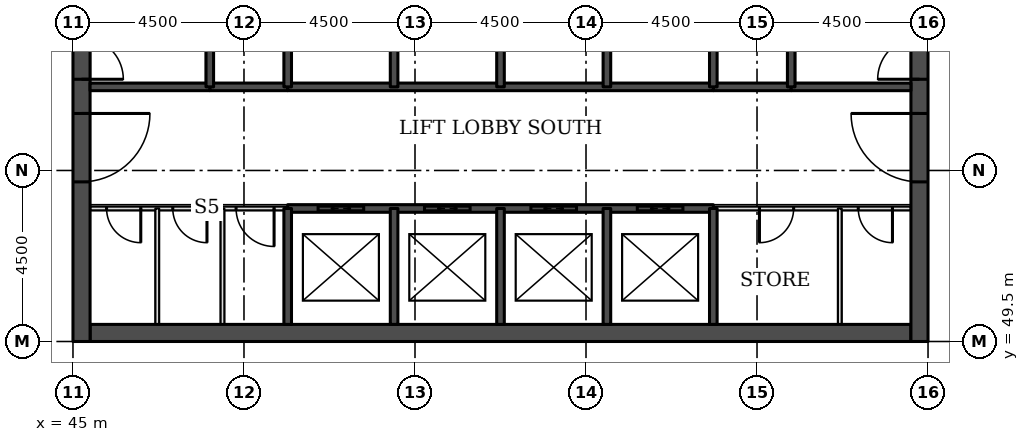
"""IFC4 building model, lengths in metres.
Left out: names, types, materials, properties, quantities, classifications, styles, units other than length and angle.
Written with IfcOpenShell. Run it as: python <this file> out.ifc"""

import sys

from ifc_helpers import new_model, si_unit, direction, frame, frame_2d, origin, place, context, subcontext, project, spatial, rectangle, extrude, element, fill, save


model = new_model("IFC4")
c1 = context("Model", 3, precision=1e-05, world=origin(), true_north=direction((0.0, 1.0)))
c2 = subcontext(c1, "Body", "Model", "MODEL_VIEW")
j1 = project(units=[si_unit("LENGTHUNIT", "METRE"), si_unit("PLANEANGLEUNIT", "RADIAN")], contexts=[c1])
p1 = place(None, origin())
s1 = spatial("IfcSite", under=j1, at=p1, CompositionType="ELEMENT")
p2 = place(p1, origin())
s2 = spatial("IfcBuilding", under=s1, at=p2, CompositionType="ELEMENT")
p3 = place(p2, frame((0.0, 0.0, 74.3)))
s3 = spatial("IfcBuildingStorey", under=s2, at=p3, CompositionType="ELEMENT", Elevation=74.3)
p4 = place(p3, frame((45.45, 49.725, 0.0), z_axis=(0.0, 0.0, 1.0), x_axis=(1.0, 0.0, 0.0)))
e1 = element("IfcWall", 1, at=p4, inside=s3, PredefinedType="SHEAR", context=c2, shape_type="SweptSolid", body=[
    extrude(rectangle(XDim=21.6, YDim=0.45, at=frame_2d((10.8, 0.0))), origin(), (0.0, 0.0, 1.0), 4.6),
])
p5 = place(p3, frame((45.225, 49.5, 0.0), z_axis=(0.0, 0.0, 1.0), x_axis=(0.0, 1.0, 0.0)))
e2 = element("IfcWall", 2, at=p5, inside=s3, PredefinedType="SHEAR", context=c2, shape_type="SweptSolid", body=[
    extrude(rectangle(XDim=22.5, YDim=0.45, at=frame_2d((11.25, 0.0))), origin(), (0.0, 0.0, 1.0), 4.6),
])
p6 = place(p5, frame((4.2, 0.0, 0.0)))
e3 = element("IfcOpeningElement", 3, at=p6, cuts=e2, PredefinedType="OPENING", context=c2, shape_type="SweptSolid", body=[
    extrude(rectangle(XDim=1.8, YDim=2.1, at=frame_2d((0.9, 1.05))), frame((0.0, 0.235, 0.0), z_axis=(0.0, -1.0, 0.0), x_axis=(1.0, 0.0, 0.0)), (0.0, 0.0, 1.0), 0.47),
])
p7 = place(p5, frame((6.9, 0.0, 0.0)))
e4 = element("IfcOpeningElement", 4, at=p7, cuts=e2, PredefinedType="OPENING", context=c2, shape_type="SweptSolid", body=[
    extrude(rectangle(XDim=1.1, YDim=2.1, at=frame_2d((0.55, 1.05))), frame((0.0, 0.235, 0.0), z_axis=(0.0, -1.0, 0.0), x_axis=(1.0, 0.0, 0.0)), (0.0, 0.0, 1.0), 0.47),
])
p8 = place(p5, frame((13.6, 0.0, 0.0)))
e5 = element("IfcOpeningElement", 5, at=p8, cuts=e2, PredefinedType="OPENING", context=c2, shape_type="SweptSolid", body=[
    extrude(rectangle(XDim=1.1, YDim=2.1, at=frame_2d((0.55, 1.05))), frame((0.0, 0.235, 0.0), z_axis=(0.0, -1.0, 0.0), x_axis=(1.0, 0.0, 0.0)), (0.0, 0.0, 1.0), 0.47),
])
p9 = place(p5, frame((16.5, 0.0, 0.0)))
e6 = element("IfcOpeningElement", 6, at=p9, cuts=e2, PredefinedType="OPENING", context=c2, shape_type="SweptSolid", body=[
    extrude(rectangle(XDim=1.8, YDim=2.1, at=frame_2d((0.9, 1.05))), frame((0.0, 0.235, 0.0), z_axis=(0.0, -1.0, 0.0), x_axis=(1.0, 0.0, 0.0)), (0.0, 0.0, 1.0), 0.47),
])
p10 = place(p3, frame((67.275, 49.5, 0.0), z_axis=(0.0, 0.0, 1.0), x_axis=(0.0, 1.0, 0.0)))
e7 = element("IfcWall", 7, at=p10, inside=s3, PredefinedType="SHEAR", context=c2, shape_type="SweptSolid", body=[
    extrude(rectangle(XDim=22.5, YDim=0.45, at=frame_2d((11.25, 0.0))), origin(), (0.0, 0.0, 1.0), 4.6),
])
p11 = place(p10, frame((4.2, 0.0, 0.0)))
e8 = element("IfcOpeningElement", 8, at=p11, cuts=e7, PredefinedType="OPENING", context=c2, shape_type="SweptSolid", body=[
    extrude(rectangle(XDim=1.8, YDim=2.1, at=frame_2d((0.9, 1.05))), frame((0.0, 0.235, 0.0), z_axis=(0.0, -1.0, 0.0), x_axis=(1.0, 0.0, 0.0)), (0.0, 0.0, 1.0), 0.47),
])
p12 = place(p10, frame((6.9, 0.0, 0.0)))
e9 = element("IfcOpeningElement", 9, at=p12, cuts=e7, PredefinedType="OPENING", context=c2, shape_type="SweptSolid", body=[
    extrude(rectangle(XDim=1.1, YDim=2.1, at=frame_2d((0.55, 1.05))), frame((0.0, 0.235, 0.0), z_axis=(0.0, -1.0, 0.0), x_axis=(1.0, 0.0, 0.0)), (0.0, 0.0, 1.0), 0.47),
])
p13 = place(p10, frame((13.6, 0.0, 0.0)))
e10 = element("IfcOpeningElement", 10, at=p13, cuts=e7, PredefinedType="OPENING", context=c2, shape_type="SweptSolid", body=[
    extrude(rectangle(XDim=1.1, YDim=2.1, at=frame_2d((0.55, 1.05))), frame((0.0, 0.235, 0.0), z_axis=(0.0, -1.0, 0.0), x_axis=(1.0, 0.0, 0.0)), (0.0, 0.0, 1.0), 0.47),
])
p14 = place(p10, frame((16.5, 0.0, 0.0)))
e11 = element("IfcOpeningElement", 11, at=p14, cuts=e7, PredefinedType="OPENING", context=c2, shape_type="SweptSolid", body=[
    extrude(rectangle(XDim=1.8, YDim=2.1, at=frame_2d((0.9, 1.05))), frame((0.0, 0.235, 0.0), z_axis=(0.0, -1.0, 0.0), x_axis=(1.0, 0.0, 0.0)), (0.0, 0.0, 1.0), 0.47),
])
p15 = place(p3, frame((45.45, 53.0, 0.0), z_axis=(0.0, 0.0, 1.0), x_axis=(1.0, 0.0, 0.0)))
e12 = element("IfcWall", 12, at=p15, inside=s3, PredefinedType="PARTITIONING", context=c2, shape_type="SweptSolid", body=[
    extrude(rectangle(XDim=5.2, YDim=0.1, at=frame_2d((2.6, 0.0))), origin(), (0.0, 0.0, 1.0), 4.45),
])
p16 = place(p15, frame((0.434, 0.0, 0.0)))
e13 = element("IfcOpeningElement", 13, at=p16, cuts=e12, PredefinedType="OPENING", context=c2, shape_type="SweptSolid", body=[
    extrude(rectangle(XDim=0.9, YDim=2.1, at=frame_2d((0.45, 1.05))), frame((0.0, 0.06, 0.0), z_axis=(0.0, -1.0, 0.0), x_axis=(1.0, 0.0, 0.0)), (0.0, 0.0, 1.0), 0.12),
])
p17 = place(p15, frame((2.176, 0.0, 0.0)))
e14 = element("IfcOpeningElement", 14, at=p17, cuts=e12, PredefinedType="OPENING", context=c2, shape_type="SweptSolid", body=[
    extrude(rectangle(XDim=0.9, YDim=2.1, at=frame_2d((0.45, 1.05))), frame((0.0, 0.06, 0.0), z_axis=(0.0, -1.0, 0.0), x_axis=(1.0, 0.0, 0.0)), (0.0, 0.0, 1.0), 0.12),
])
p18 = place(p15, frame((3.842, 0.0, 0.0)))
e15 = element("IfcOpeningElement", 15, at=p18, cuts=e12, PredefinedType="OPENING", context=c2, shape_type="SweptSolid", body=[
    extrude(rectangle(XDim=1.0, YDim=2.1, at=frame_2d((0.5, 1.05))), frame((0.0, 0.06, 0.0), z_axis=(0.0, -1.0, 0.0), x_axis=(1.0, 0.0, 0.0)), (0.0, 0.0, 1.0), 0.12),
])
p19 = place(p3, frame((61.85, 53.0, 0.0), z_axis=(0.0, 0.0, 1.0), x_axis=(1.0, 0.0, 0.0)))
e16 = element("IfcWall", 16, at=p19, inside=s3, PredefinedType="PARTITIONING", context=c2, shape_type="SweptSolid", body=[
    extrude(rectangle(XDim=5.2, YDim=0.1, at=frame_2d((2.6, 0.0))), origin(), (0.0, 0.0, 1.0), 4.45),
])
p20 = place(p19, frame((3.814, 0.0, 0.0)))
e17 = element("IfcOpeningElement", 17, at=p20, cuts=e16, PredefinedType="OPENING", context=c2, shape_type="SweptSolid", body=[
    extrude(rectangle(XDim=0.9, YDim=2.1, at=frame_2d((0.45, 1.05))), frame((0.0, 0.06, 0.0), z_axis=(0.0, -1.0, 0.0), x_axis=(1.0, 0.0, 0.0)), (0.0, 0.0, 1.0), 0.12),
])
p21 = place(p19, frame((1.214, 0.0, 0.0)))
e18 = element("IfcOpeningElement", 18, at=p21, cuts=e16, PredefinedType="OPENING", context=c2, shape_type="SweptSolid", body=[
    extrude(rectangle(XDim=0.9, YDim=2.1, at=frame_2d((0.45, 1.05))), frame((0.0, 0.06, 0.0), z_axis=(0.0, -1.0, 0.0), x_axis=(1.0, 0.0, 0.0)), (0.0, 0.0, 1.0), 0.12),
])
p22 = place(p3, frame((50.65, 53.0, 0.0), z_axis=(0.0, 0.0, 1.0), x_axis=(1.0, 0.0, 0.0)))
e19 = element("IfcWall", 19, at=p22, inside=s3, PredefinedType="SOLIDWALL", context=c2, shape_type="SweptSolid", body=[
    extrude(rectangle(XDim=11.2, YDim=0.2, at=frame_2d((5.6, 0.0))), origin(), (0.0, 0.0, 1.0), 4.45),
])
p23 = place(p22, frame((0.8, 0.0, 0.0)))
e20 = element("IfcOpeningElement", 20, at=p23, cuts=e19, PredefinedType="OPENING", context=c2, shape_type="SweptSolid", body=[
    extrude(rectangle(XDim=1.2, YDim=2.1, at=frame_2d((0.6, 1.05))), frame((0.0, 0.11, 0.0), z_axis=(0.0, -1.0, 0.0), x_axis=(1.0, 0.0, 0.0)), (0.0, 0.0, 1.0), 0.22),
])
p24 = place(p22, frame((3.6, 0.0, 0.0)))
e21 = element("IfcOpeningElement", 21, at=p24, cuts=e19, PredefinedType="OPENING", context=c2, shape_type="SweptSolid", body=[
    extrude(rectangle(XDim=1.2, YDim=2.1, at=frame_2d((0.6, 1.05))), frame((0.0, 0.11, 0.0), z_axis=(0.0, -1.0, 0.0), x_axis=(1.0, 0.0, 0.0)), (0.0, 0.0, 1.0), 0.22),
])
p25 = place(p22, frame((6.4, 0.0, 0.0)))
e22 = element("IfcOpeningElement", 22, at=p25, cuts=e19, PredefinedType="OPENING", context=c2, shape_type="SweptSolid", body=[
    extrude(rectangle(XDim=1.2, YDim=2.1, at=frame_2d((0.6, 1.05))), frame((0.0, 0.11, 0.0), z_axis=(0.0, -1.0, 0.0), x_axis=(1.0, 0.0, 0.0)), (0.0, 0.0, 1.0), 0.22),
])
p26 = place(p22, frame((9.2, 0.0, 0.0)))
e23 = element("IfcOpeningElement", 23, at=p26, cuts=e19, PredefinedType="OPENING", context=c2, shape_type="SweptSolid", body=[
    extrude(rectangle(XDim=1.2, YDim=2.1, at=frame_2d((0.6, 1.05))), frame((0.0, 0.11, 0.0), z_axis=(0.0, -1.0, 0.0), x_axis=(1.0, 0.0, 0.0)), (0.0, 0.0, 1.0), 0.22),
])
for number, where, z_axis, x_axis in (
    (24, (48.6, 56.2, 0.0), (0.0, 0.0, 1.0), (1.0, 0.0, 0.0)),
    (25, (61.85, 56.2, 0.0), (0.0, 0.0, 1.0), (1.0, 0.0, 0.0)),
):
    element("IfcWall", number, at=place(p3, frame(where, z_axis=z_axis, x_axis=x_axis)), inside=s3, PredefinedType="SOLIDWALL", context=c2, shape_type="SweptSolid", body=[
        extrude(rectangle(XDim=2.05, YDim=0.2, at=frame_2d((1.025, 0.0))), origin(), (0.0, 0.0, 1.0), 4.45),
    ])
p27 = place(p3, frame((45.45, 56.2, 0.0), z_axis=(0.0, 0.0, 1.0), x_axis=(1.0, 0.0, 0.0)))
e26 = element("IfcWall", 26, at=p27, inside=s3, PredefinedType="SOLIDWALL", context=c2, shape_type="SweptSolid", body=[
    extrude(rectangle(XDim=3.15, YDim=0.2, at=frame_2d((1.575, 0.0))), origin(), (0.0, 0.0, 1.0), 4.45),
])
p28 = place(p3, frame((50.65, 56.2, 0.0), z_axis=(0.0, 0.0, 1.0), x_axis=(1.0, 0.0, 0.0)))
e27 = element("IfcWall", 27, at=p28, inside=s3, PredefinedType="SOLIDWALL", context=c2, shape_type="SweptSolid", body=[
    extrude(rectangle(XDim=11.2, YDim=0.2, at=frame_2d((5.6, 0.0))), origin(), (0.0, 0.0, 1.0), 4.45),
])
p29 = place(p3, frame((63.9, 56.2, 0.0), z_axis=(0.0, 0.0, 1.0), x_axis=(1.0, 0.0, 0.0)))
e28 = element("IfcWall", 28, at=p29, inside=s3, PredefinedType="SOLIDWALL", context=c2, shape_type="SweptSolid", body=[
    extrude(rectangle(XDim=3.15, YDim=0.2, at=frame_2d((1.575, 0.0))), origin(), (0.0, 0.0, 1.0), 4.45),
])
p30 = place(p3, frame((47.218, 49.95, 0.0), z_axis=(0.0, 0.0, 1.0), x_axis=(0.0, 1.0, 0.0)))
e29 = element("IfcWall", 29, at=p30, inside=s3, PredefinedType="PARTITIONING", context=c2, shape_type="SweptSolid", body=[
    extrude(rectangle(XDim=3.05, YDim=0.1, at=frame_2d((1.525, 0.0))), origin(), (0.0, 0.0, 1.0), 4.45),
])
p31 = place(p3, frame((48.6, 56.2, 0.0), z_axis=(0.0, 0.0, 1.0), x_axis=(0.0, 1.0, 0.0)))
e30 = element("IfcWall", 30, at=p31, inside=s3, PredefinedType="SOLIDWALL", context=c2, shape_type="SweptSolid", body=[
    extrude(rectangle(XDim=5.8, YDim=0.2, at=frame_2d((2.9, 0.0))), origin(), (0.0, 0.0, 1.0), 4.45),
])
p32 = place(p3, frame((48.934, 49.95, 0.0), z_axis=(0.0, 0.0, 1.0), x_axis=(0.0, 1.0, 0.0)))
e31 = element("IfcWall", 31, at=p32, inside=s3, PredefinedType="PARTITIONING", context=c2, shape_type="SweptSolid", body=[
    extrude(rectangle(XDim=3.05, YDim=0.1, at=frame_2d((1.525, 0.0))), origin(), (0.0, 0.0, 1.0), 4.45),
])
p33 = place(p3, frame((50.65, 49.95, 0.0), z_axis=(0.0, 0.0, 1.0), x_axis=(0.0, 1.0, 0.0)))
e32 = element("IfcWall", 32, at=p33, inside=s3, PredefinedType="SOLIDWALL", context=c2, shape_type="SweptSolid", body=[
    extrude(rectangle(XDim=3.05, YDim=0.2, at=frame_2d((1.525, 0.0))), origin(), (0.0, 0.0, 1.0), 4.45),
])
p34 = place(p3, frame((50.65, 56.2, 0.0), z_axis=(0.0, 0.0, 1.0), x_axis=(0.0, 1.0, 0.0)))
e33 = element("IfcWall", 33, at=p34, inside=s3, PredefinedType="SOLIDWALL", context=c2, shape_type="SweptSolid", body=[
    extrude(rectangle(XDim=2.8, YDim=0.2, at=frame_2d((1.4, 0.0))), origin(), (0.0, 0.0, 1.0), 4.45),
])
p35 = place(p3, frame((53.45, 49.95, 0.0), z_axis=(0.0, 0.0, 1.0), x_axis=(0.0, 1.0, 0.0)))
e34 = element("IfcWall", 34, at=p35, inside=s3, PredefinedType="SOLIDWALL", context=c2, shape_type="SweptSolid", body=[
    extrude(rectangle(XDim=3.05, YDim=0.2, at=frame_2d((1.525, 0.0))), origin(), (0.0, 0.0, 1.0), 4.45),
])
p36 = place(p3, frame((53.45, 56.2, 0.0), z_axis=(0.0, 0.0, 1.0), x_axis=(0.0, 1.0, 0.0)))
e35 = element("IfcWall", 35, at=p36, inside=s3, PredefinedType="SOLIDWALL", context=c2, shape_type="SweptSolid", body=[
    extrude(rectangle(XDim=2.8, YDim=0.2, at=frame_2d((1.4, 0.0))), origin(), (0.0, 0.0, 1.0), 4.45),
])
p37 = place(p3, frame((56.25, 49.95, 0.0), z_axis=(0.0, 0.0, 1.0), x_axis=(0.0, 1.0, 0.0)))
e36 = element("IfcWall", 36, at=p37, inside=s3, PredefinedType="SOLIDWALL", context=c2, shape_type="SweptSolid", body=[
    extrude(rectangle(XDim=3.05, YDim=0.2, at=frame_2d((1.525, 0.0))), origin(), (0.0, 0.0, 1.0), 4.45),
])
p38 = place(p3, frame((56.25, 56.2, 0.0), z_axis=(0.0, 0.0, 1.0), x_axis=(0.0, 1.0, 0.0)))
e37 = element("IfcWall", 37, at=p38, inside=s3, PredefinedType="SOLIDWALL", context=c2, shape_type="SweptSolid", body=[
    extrude(rectangle(XDim=2.8, YDim=0.2, at=frame_2d((1.4, 0.0))), origin(), (0.0, 0.0, 1.0), 4.45),
])
p39 = place(p3, frame((59.05, 49.95, 0.0), z_axis=(0.0, 0.0, 1.0), x_axis=(0.0, 1.0, 0.0)))
e38 = element("IfcWall", 38, at=p39, inside=s3, PredefinedType="SOLIDWALL", context=c2, shape_type="SweptSolid", body=[
    extrude(rectangle(XDim=3.05, YDim=0.2, at=frame_2d((1.525, 0.0))), origin(), (0.0, 0.0, 1.0), 4.45),
])
p40 = place(p3, frame((59.05, 56.2, 0.0), z_axis=(0.0, 0.0, 1.0), x_axis=(0.0, 1.0, 0.0)))
e39 = element("IfcWall", 39, at=p40, inside=s3, PredefinedType="SOLIDWALL", context=c2, shape_type="SweptSolid", body=[
    extrude(rectangle(XDim=2.8, YDim=0.2, at=frame_2d((1.4, 0.0))), origin(), (0.0, 0.0, 1.0), 4.45),
])
p41 = place(p3, frame((61.85, 49.95, 0.0), z_axis=(0.0, 0.0, 1.0), x_axis=(0.0, 1.0, 0.0)))
e40 = element("IfcWall", 40, at=p41, inside=s3, PredefinedType="SOLIDWALL", context=c2, shape_type="SweptSolid", body=[
    extrude(rectangle(XDim=3.05, YDim=0.2, at=frame_2d((1.525, 0.0))), origin(), (0.0, 0.0, 1.0), 4.45),
])
p42 = place(p3, frame((61.85, 56.2, 0.0), z_axis=(0.0, 0.0, 1.0), x_axis=(0.0, 1.0, 0.0)))
e41 = element("IfcWall", 41, at=p42, inside=s3, PredefinedType="SOLIDWALL", context=c2, shape_type="SweptSolid", body=[
    extrude(rectangle(XDim=2.8, YDim=0.2, at=frame_2d((1.4, 0.0))), origin(), (0.0, 0.0, 1.0), 4.45),
])
p43 = place(p3, frame((63.9, 56.2, 0.0), z_axis=(0.0, 0.0, 1.0), x_axis=(0.0, 1.0, 0.0)))
e42 = element("IfcWall", 42, at=p43, inside=s3, PredefinedType="SOLIDWALL", context=c2, shape_type="SweptSolid", body=[
    extrude(rectangle(XDim=5.8, YDim=0.2, at=frame_2d((2.9, 0.0))), origin(), (0.0, 0.0, 1.0), 4.45),
])
p44 = place(p3, frame((65.178, 49.95, 0.0), z_axis=(0.0, 0.0, 1.0), x_axis=(0.0, 1.0, 0.0)))
e43 = element("IfcWall", 43, at=p44, inside=s3, PredefinedType="PARTITIONING", context=c2, shape_type="SweptSolid", body=[
    extrude(rectangle(XDim=3.05, YDim=0.1, at=frame_2d((1.525, 0.0))), origin(), (0.0, 0.0, 1.0), 4.45),
])
p45 = place(p23, origin())
e44 = element("IfcDoor", 44, at=p45, inside=s3, OperationType="DOUBLE_DOOR_SLIDING", PredefinedType="DOOR", context=c2, shape_type="SweptSolid", body=[
    extrude(rectangle(XDim=1.2, YDim=2.1, at=frame_2d((0.6, 1.05))), frame((0.0, 0.025, 0.0), z_axis=(0.0, -1.0, 0.0), x_axis=(1.0, 0.0, 0.0)), (0.0, 0.0, 1.0), 0.05),
])
fill(e20, e44)
p46 = place(p24, origin())
e45 = element("IfcDoor", 45, at=p46, inside=s3, OperationType="DOUBLE_DOOR_SLIDING", PredefinedType="DOOR", context=c2, shape_type="SweptSolid", body=[
    extrude(rectangle(XDim=1.2, YDim=2.1, at=frame_2d((0.6, 1.05))), frame((0.0, 0.025, 0.0), z_axis=(0.0, -1.0, 0.0), x_axis=(1.0, 0.0, 0.0)), (0.0, 0.0, 1.0), 0.05),
])
fill(e21, e45)
p47 = place(p25, origin())
e46 = element("IfcDoor", 46, at=p47, inside=s3, OperationType="DOUBLE_DOOR_SLIDING", PredefinedType="DOOR", context=c2, shape_type="SweptSolid", body=[
    extrude(rectangle(XDim=1.2, YDim=2.1, at=frame_2d((0.6, 1.05))), frame((0.0, 0.025, 0.0), z_axis=(0.0, -1.0, 0.0), x_axis=(1.0, 0.0, 0.0)), (0.0, 0.0, 1.0), 0.05),
])
fill(e22, e46)
p48 = place(p26, origin())
e47 = element("IfcDoor", 47, at=p48, inside=s3, OperationType="DOUBLE_DOOR_SLIDING", PredefinedType="DOOR", context=c2, shape_type="SweptSolid", body=[
    extrude(rectangle(XDim=1.2, YDim=2.1, at=frame_2d((0.6, 1.05))), frame((0.0, 0.025, 0.0), z_axis=(0.0, -1.0, 0.0), x_axis=(1.0, 0.0, 0.0)), (0.0, 0.0, 1.0), 0.05),
])
fill(e23, e47)
p49 = place(p6, frame((1.8, 0.0, 0.0), z_axis=(0.0, 0.0, 1.0), x_axis=(-1.0, 0.0, 0.0)))
e48 = element("IfcDoor", 48, at=p49, inside=s3, OperationType="SINGLE_SWING_LEFT", PredefinedType="DOOR", context=c2, shape_type="SweptSolid", body=[
    extrude(rectangle(XDim=1.8, YDim=2.1, at=frame_2d((0.9, 1.05))), frame((0.0, 0.025, 0.0), z_axis=(0.0, -1.0, 0.0), x_axis=(1.0, 0.0, 0.0)), (0.0, 0.0, 1.0), 0.05),
])
fill(e3, e48)
p50 = place(p7, frame((1.1, 0.0, 0.0), z_axis=(0.0, 0.0, 1.0), x_axis=(-1.0, 0.0, 0.0)))
e49 = element("IfcDoor", 49, at=p50, inside=s3, OperationType="SINGLE_SWING_RIGHT", PredefinedType="DOOR", context=c2, shape_type="SweptSolid", body=[
    extrude(rectangle(XDim=1.1, YDim=2.1, at=frame_2d((0.55, 1.05))), frame((0.0, 0.025, 0.0), z_axis=(0.0, -1.0, 0.0), x_axis=(1.0, 0.0, 0.0)), (0.0, 0.0, 1.0), 0.05),
])
fill(e4, e49)
p51 = place(p11, origin())
e50 = element("IfcDoor", 50, at=p51, inside=s3, OperationType="SINGLE_SWING_RIGHT", PredefinedType="DOOR", context=c2, shape_type="SweptSolid", body=[
    extrude(rectangle(XDim=1.8, YDim=2.1, at=frame_2d((0.9, 1.05))), frame((0.0, 0.025, 0.0), z_axis=(0.0, -1.0, 0.0), x_axis=(1.0, 0.0, 0.0)), (0.0, 0.0, 1.0), 0.05),
])
fill(e8, e50)
p52 = place(p12, origin())
e51 = element("IfcDoor", 51, at=p52, inside=s3, OperationType="SINGLE_SWING_LEFT", PredefinedType="DOOR", context=c2, shape_type="SweptSolid", body=[
    extrude(rectangle(XDim=1.1, YDim=2.1, at=frame_2d((0.55, 1.05))), frame((0.0, 0.025, 0.0), z_axis=(0.0, -1.0, 0.0), x_axis=(1.0, 0.0, 0.0)), (0.0, 0.0, 1.0), 0.05),
])
fill(e9, e51)
p53 = place(p20, frame((0.9, 0.0, 0.0), z_axis=(0.0, 0.0, 1.0), x_axis=(-1.0, 0.0, 0.0)))
e52 = element("IfcDoor", 52, at=p53, inside=s3, OperationType="SINGLE_SWING_LEFT", PredefinedType="DOOR", context=c2, shape_type="SweptSolid", body=[
    extrude(rectangle(XDim=0.9, YDim=2.1, at=frame_2d((0.45, 1.05))), frame((0.0, 0.025, 0.0), z_axis=(0.0, -1.0, 0.0), x_axis=(1.0, 0.0, 0.0)), (0.0, 0.0, 1.0), 0.05),
])
fill(e17, e52)
p54 = place(p21, frame((0.9, 0.0, 0.0), z_axis=(0.0, 0.0, 1.0), x_axis=(-1.0, 0.0, 0.0)))
e53 = element("IfcDoor", 53, at=p54, inside=s3, OperationType="SINGLE_SWING_RIGHT", PredefinedType="DOOR", context=c2, shape_type="SweptSolid", body=[
    extrude(rectangle(XDim=0.9, YDim=2.1, at=frame_2d((0.45, 1.05))), frame((0.0, 0.025, 0.0), z_axis=(0.0, -1.0, 0.0), x_axis=(1.0, 0.0, 0.0)), (0.0, 0.0, 1.0), 0.05),
])
fill(e18, e53)
p55 = place(p16, frame((0.9, 0.0, 0.0), z_axis=(0.0, 0.0, 1.0), x_axis=(-1.0, 0.0, 0.0)))
e54 = element("IfcDoor", 54, at=p55, inside=s3, OperationType="SINGLE_SWING_LEFT", PredefinedType="DOOR", context=c2, shape_type="SweptSolid", body=[
    extrude(rectangle(XDim=0.9, YDim=2.1, at=frame_2d((0.45, 1.05))), frame((0.0, 0.025, 0.0), z_axis=(0.0, -1.0, 0.0), x_axis=(1.0, 0.0, 0.0)), (0.0, 0.0, 1.0), 0.05),
])
fill(e13, e54)
p56 = place(p17, frame((0.9, 0.0, 0.0), z_axis=(0.0, 0.0, 1.0), x_axis=(-1.0, 0.0, 0.0)))
e55 = element("IfcDoor", 55, at=p56, inside=s3, OperationType="SINGLE_SWING_LEFT", PredefinedType="DOOR", context=c2, shape_type="SweptSolid", body=[
    extrude(rectangle(XDim=0.9, YDim=2.1, at=frame_2d((0.45, 1.05))), frame((0.0, 0.025, 0.0), z_axis=(0.0, -1.0, 0.0), x_axis=(1.0, 0.0, 0.0)), (0.0, 0.0, 1.0), 0.05),
])
fill(e14, e55)
p57 = place(p18, frame((1.0, 0.0, 0.0), z_axis=(0.0, 0.0, 1.0), x_axis=(-1.0, 0.0, 0.0)))
e56 = element("IfcDoor", 56, at=p57, inside=s3, OperationType="SINGLE_SWING_LEFT", PredefinedType="DOOR", context=c2, shape_type="SweptSolid", body=[
    extrude(rectangle(XDim=1.0, YDim=2.1, at=frame_2d((0.5, 1.05))), frame((0.0, 0.025, 0.0), z_axis=(0.0, -1.0, 0.0), x_axis=(1.0, 0.0, 0.0)), (0.0, 0.0, 1.0), 0.05),
])
fill(e15, e56)
save(model, sys.argv[1])
